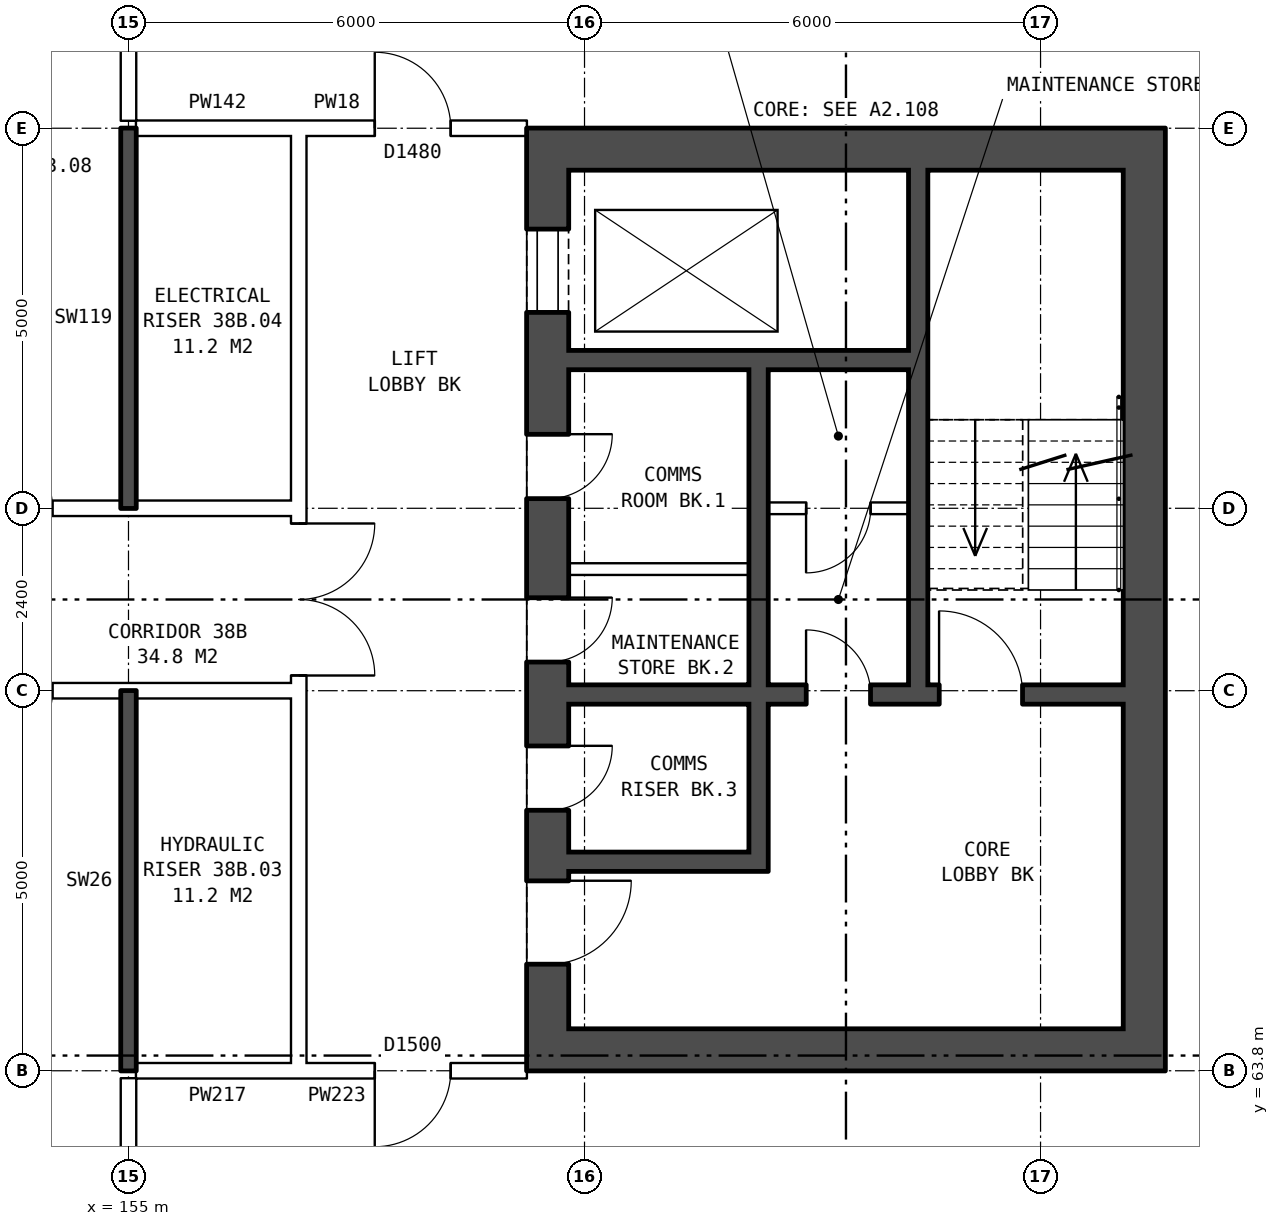
"""IFC4 building model, lengths in metres.
Left out: names, types, materials, properties, quantities, classifications, styles, units other than length and angle.
Written with IfcOpenShell. Run it as: python <this file> out.ifc"""

import sys

from ifc_helpers import new_model, si_unit, direction, frame, frame_2d, origin, place, context, subcontext, project, spatial, rectangle, extrude, element, fill, save


model = new_model("IFC4")
c1 = context("Model", 3, precision=1e-05, world=origin(), true_north=direction((0.0, 1.0)))
c2 = subcontext(c1, "Body", "Model", "MODEL_VIEW")
j1 = project(units=[si_unit("LENGTHUNIT", "METRE"), si_unit("PLANEANGLEUNIT", "RADIAN")], contexts=[c1])
p1 = place(None, origin())
s1 = spatial("IfcSite", under=j1, at=p1, CompositionType="ELEMENT")
p2 = place(p1, origin())
s2 = spatial("IfcBuilding", under=s1, at=p2, CompositionType="ELEMENT")
p3 = place(p2, frame((0.0, 0.0, 136.1)))
s3 = spatial("IfcBuildingStorey", under=s2, at=p3, CompositionType="ELEMENT", Elevation=136.1)
p4 = place(p3, frame((160.515, 76.2, 0.0), z_axis=(0.0, 0.0, 1.0), x_axis=(0.0, -1.0, 0.0)))
e1 = element("IfcWall", 1, at=p4, inside=s3, PredefinedType="SHEAR", context=c2, shape_type="SweptSolid", body=[
    extrude(rectangle(XDim=12.4, YDim=0.55, at=frame_2d((6.2, 0.0))), origin(), (0.0, 0.0, 1.0), 2.85),
])
p5 = place(p4, frame((1.325, 0.0, 0.0)))
e2 = element("IfcOpeningElement", 2, at=p5, cuts=e1, PredefinedType="OPENING", context=c2, shape_type="SweptSolid", body=[
    extrude(rectangle(XDim=1.1, YDim=2.1, at=frame_2d((0.55, 1.05))), frame((0.0, 0.285, 0.0), z_axis=(0.0, -1.0, 0.0), x_axis=(1.0, 0.0, 0.0)), (0.0, 0.0, 1.0), 0.57),
])
p6 = place(p4, frame((4.025, 0.0, 0.0)))
e3 = element("IfcOpeningElement", 3, at=p6, cuts=e1, PredefinedType="OPENING", context=c2, shape_type="SweptSolid", body=[
    extrude(rectangle(XDim=0.85, YDim=2.1, at=frame_2d((0.425, 1.05))), frame((0.0, 0.285, 0.0), z_axis=(0.0, -1.0, 0.0), x_axis=(1.0, 0.0, 0.0)), (0.0, 0.0, 1.0), 0.57),
])
p7 = place(p4, frame((6.175, 0.0, 0.0)))
e4 = element("IfcOpeningElement", 4, at=p7, cuts=e1, PredefinedType="OPENING", context=c2, shape_type="SweptSolid", body=[
    extrude(rectangle(XDim=0.85, YDim=2.1, at=frame_2d((0.425, 1.05))), frame((0.0, 0.285, 0.0), z_axis=(0.0, -1.0, 0.0), x_axis=(1.0, 0.0, 0.0)), (0.0, 0.0, 1.0), 0.57),
])
p8 = place(p4, frame((9.9, 0.0, 0.0)))
e5 = element("IfcOpeningElement", 5, at=p8, cuts=e1, PredefinedType="OPENING", context=c2, shape_type="SweptSolid", body=[
    extrude(rectangle(XDim=1.1, YDim=2.1, at=frame_2d((0.55, 1.05))), frame((0.0, 0.285, 0.0), z_axis=(0.0, -1.0, 0.0), x_axis=(1.0, 0.0, 0.0)), (0.0, 0.0, 1.0), 0.57),
])
p9 = place(p4, frame((8.125, 0.0, 0.0)))
e6 = element("IfcOpeningElement", 6, at=p9, cuts=e1, PredefinedType="OPENING", context=c2, shape_type="SweptSolid", body=[
    extrude(rectangle(XDim=0.85, YDim=2.1, at=frame_2d((0.425, 1.05))), frame((0.0, 0.285, 0.0), z_axis=(0.0, -1.0, 0.0), x_axis=(1.0, 0.0, 0.0)), (0.0, 0.0, 1.0), 0.57),
])
p10 = place(p3, frame((168.365, 76.2, 0.0), z_axis=(0.0, 0.0, 1.0), x_axis=(0.0, -1.0, 0.0)))
e7 = element("IfcWall", 7, at=p10, inside=s3, PredefinedType="SHEAR", context=c2, shape_type="SweptSolid", body=[
    extrude(rectangle(XDim=12.4, YDim=0.55, at=frame_2d((6.2, 0.0))), origin(), (0.0, 0.0, 1.0), 2.85),
])
for number, where, z_axis, x_axis in (
    (8, (160.79, 75.925, 0.0), (0.0, 0.0, 1.0), (1.0, 0.0, 0.0)),
    (9, (160.79, 64.075, 0.0), (0.0, 0.0, 1.0), (1.0, 0.0, 0.0)),
):
    element("IfcWall", number, at=place(p3, frame(where, z_axis=z_axis, x_axis=x_axis)), inside=s3, PredefinedType="SHEAR", context=c2, shape_type="SweptSolid", body=[
        extrude(rectangle(XDim=7.3, YDim=0.55, at=frame_2d((3.65, 0.0))), origin(), (0.0, 0.0, 1.0), 2.85),
    ])
p11 = place(p3, frame((160.79, 73.15, 0.0), z_axis=(0.0, 0.0, 1.0), x_axis=(1.0, 0.0, 0.0)))
e10 = element("IfcWall", 10, at=p11, inside=s3, PredefinedType="SHEAR", context=c2, shape_type="SweptSolid", body=[
    extrude(rectangle(XDim=4.475, YDim=0.25, at=frame_2d((2.237, 0.0))), origin(), (0.0, 0.0, 1.0), 2.85),
])
p12 = place(p3, frame((163.415, 71.2, 0.0), z_axis=(0.0, 0.0, 1.0), x_axis=(1.0, 0.0, 0.0)))
e11 = element("IfcWall", 11, at=p12, inside=s3, PredefinedType="PARTITIONING", context=c2, shape_type="SweptSolid", body=[
    extrude(rectangle(XDim=1.85, YDim=0.15, at=frame_2d((0.925, 0.0))), origin(), (0.0, 0.0, 1.0), 2.85),
])
p13 = place(p12, frame((0.5, 0.0, 0.0)))
e12 = element("IfcOpeningElement", 12, at=p13, cuts=e11, PredefinedType="OPENING", context=c2, shape_type="SweptSolid", body=[
    extrude(rectangle(XDim=0.85, YDim=2.1, at=frame_2d((0.425, 1.05))), frame((0.0, 0.085, 0.0), z_axis=(0.0, -1.0, 0.0), x_axis=(1.0, 0.0, 0.0)), (0.0, 0.0, 1.0), 0.17),
])
p14 = place(p3, frame((160.79, 70.4, 0.0), z_axis=(0.0, 0.0, 1.0), x_axis=(1.0, 0.0, 0.0)))
e13 = element("IfcWall", 13, at=p14, inside=s3, PredefinedType="PARTITIONING", context=c2, shape_type="SweptSolid", body=[
    extrude(rectangle(XDim=2.375, YDim=0.15, at=frame_2d((1.188, 0.0))), origin(), (0.0, 0.0, 1.0), 2.85),
])
p15 = place(p3, frame((160.79, 68.75, 0.0), z_axis=(0.0, 0.0, 1.0), x_axis=(1.0, 0.0, 0.0)))
e14 = element("IfcWall", 14, at=p15, inside=s3, PredefinedType="SHEAR", context=c2, shape_type="SweptSolid", body=[
    extrude(rectangle(XDim=7.3, YDim=0.25, at=frame_2d((3.65, 0.0))), origin(), (0.0, 0.0, 1.0), 2.85),
])
p16 = place(p15, frame((4.875, 0.0, 0.0)))
e15 = element("IfcOpeningElement", 15, at=p16, cuts=e14, PredefinedType="OPENING", context=c2, shape_type="SweptSolid", body=[
    extrude(rectangle(XDim=1.1, YDim=2.1, at=frame_2d((0.55, 1.05))), frame((0.0, 0.135, 0.0), z_axis=(0.0, -1.0, 0.0), x_axis=(1.0, 0.0, 0.0)), (0.0, 0.0, 1.0), 0.27),
])
p17 = place(p15, frame((3.125, 0.0, 0.0)))
e16 = element("IfcOpeningElement", 16, at=p17, cuts=e14, PredefinedType="OPENING", context=c2, shape_type="SweptSolid", body=[
    extrude(rectangle(XDim=0.85, YDim=2.1, at=frame_2d((0.425, 1.05))), frame((0.0, 0.135, 0.0), z_axis=(0.0, -1.0, 0.0), x_axis=(1.0, 0.0, 0.0)), (0.0, 0.0, 1.0), 0.27),
])
p18 = place(p3, frame((160.79, 66.55, 0.0), z_axis=(0.0, 0.0, 1.0), x_axis=(1.0, 0.0, 0.0)))
e17 = element("IfcWall", 17, at=p18, inside=s3, PredefinedType="SHEAR", context=c2, shape_type="SweptSolid", body=[
    extrude(rectangle(XDim=2.375, YDim=0.25, at=frame_2d((1.188, 0.0))), origin(), (0.0, 0.0, 1.0), 2.85),
])
p19 = place(p3, frame((163.29, 73.025, 0.0), z_axis=(0.0, 0.0, 1.0), x_axis=(0.0, -1.0, 0.0)))
e18 = element("IfcWall", 18, at=p19, inside=s3, PredefinedType="SHEAR", context=c2, shape_type="SweptSolid", body=[
    extrude(rectangle(XDim=4.15, YDim=0.25, at=frame_2d((2.075, 0.0))), origin(), (0.0, 0.0, 1.0), 2.85),
])
p20 = place(p3, frame((163.29, 68.625, 0.0), z_axis=(0.0, 0.0, 1.0), x_axis=(0.0, -1.0, 0.0)))
e19 = element("IfcWall", 19, at=p20, inside=s3, PredefinedType="SHEAR", context=c2, shape_type="SweptSolid", body=[
    extrude(rectangle(XDim=2.2, YDim=0.25, at=frame_2d((1.1, 0.0))), origin(), (0.0, 0.0, 1.0), 2.85),
])
p21 = place(p3, frame((165.39, 75.65, 0.0), z_axis=(0.0, 0.0, 1.0), x_axis=(0.0, -1.0, 0.0)))
e20 = element("IfcWall", 20, at=p21, inside=s3, PredefinedType="SHEAR", context=c2, shape_type="SweptSolid", body=[
    extrude(rectangle(XDim=6.775, YDim=0.25, at=frame_2d((3.387, 0.0))), origin(), (0.0, 0.0, 1.0), 2.85),
])
p22 = place(p3, frame((157.24, 63.9, 0.0), z_axis=(0.0, 0.0, 1.0), x_axis=(0.0, 1.0, 0.0)))
e21 = element("IfcWall", 21, at=p22, inside=s3, PredefinedType="PARTITIONING", context=c2, shape_type="SweptSolid", body=[
    extrude(rectangle(XDim=12.2, YDim=0.2, at=frame_2d((6.1, 0.0))), origin(), (0.0, 0.0, 1.0), 2.85),
])
p23 = place(p22, frame((5.1, 0.0, 0.0)))
e22 = element("IfcOpeningElement", 22, at=p23, cuts=e21, PredefinedType="OPENING", context=c2, shape_type="SweptSolid", body=[
    extrude(rectangle(XDim=2.0, YDim=2.1, at=frame_2d((1.0, 1.05))), frame((0.0, 0.11, 0.0), z_axis=(0.0, -1.0, 0.0), x_axis=(1.0, 0.0, 0.0)), (0.0, 0.0, 1.0), 0.22),
])
p24 = place(p3, frame((155.1, 63.8, 0.0), z_axis=(0.0, 0.0, 1.0), x_axis=(1.0, 0.0, 0.0)))
e23 = element("IfcWall", 23, at=p24, inside=s3, PredefinedType="PARTITIONING", context=c2, shape_type="SweptSolid", body=[
    extrude(rectangle(XDim=2.14, YDim=0.2, at=frame_2d((1.07, 0.0))), origin(), (0.0, 0.0, 1.0), 2.85),
])
p25 = place(p3, frame((157.24, 63.8, 0.0), z_axis=(0.0, 0.0, 1.0), x_axis=(1.0, 0.0, 0.0)))
e24 = element("IfcWall", 24, at=p25, inside=s3, PredefinedType="PARTITIONING", context=c2, shape_type="SweptSolid", body=[
    extrude(rectangle(XDim=3.0, YDim=0.2, at=frame_2d((1.5, 0.0))), origin(), (0.0, 0.0, 1.0), 2.85),
])
p26 = place(p25, frame((1.0, 0.0, 0.0)))
e25 = element("IfcOpeningElement", 25, at=p26, cuts=e24, PredefinedType="OPENING", context=c2, shape_type="SweptSolid", body=[
    extrude(rectangle(XDim=1.0, YDim=2.1, at=frame_2d((0.5, 1.05))), frame((0.0, 0.11, 0.0), z_axis=(0.0, -1.0, 0.0), x_axis=(1.0, 0.0, 0.0)), (0.0, 0.0, 1.0), 0.22),
])
p27 = place(p3, frame((142.76, 68.8, 0.0), z_axis=(0.0, 0.0, 1.0), x_axis=(1.0, 0.0, 0.0)))
e26 = element("IfcWall", 26, at=p27, inside=s3, PredefinedType="PARTITIONING", context=c2, shape_type="SweptSolid", body=[
    extrude(rectangle(XDim=14.48, YDim=0.2, at=frame_2d((7.24, 0.0))), origin(), (0.0, 0.0, 1.0), 2.85),
])
p28 = place(p27, frame((4.24, 0.0, 0.0)))
e27 = element("IfcOpeningElement", 27, at=p28, cuts=e26, PredefinedType="OPENING", context=c2, shape_type="SweptSolid", body=[
    extrude(rectangle(XDim=1.0, YDim=2.1, at=frame_2d((0.5, 1.05))), frame((0.0, 0.11, 0.0), z_axis=(0.0, -1.0, 0.0), x_axis=(1.0, 0.0, 0.0)), (0.0, 0.0, 1.0), 0.22),
])
p29 = place(p27, frame((10.24, 0.0, 0.0)))
e28 = element("IfcOpeningElement", 28, at=p29, cuts=e26, PredefinedType="OPENING", context=c2, shape_type="SweptSolid", body=[
    extrude(rectangle(XDim=1.0, YDim=2.1, at=frame_2d((0.5, 1.05))), frame((0.0, 0.11, 0.0), z_axis=(0.0, -1.0, 0.0), x_axis=(1.0, 0.0, 0.0)), (0.0, 0.0, 1.0), 0.22),
])
p30 = place(p3, frame((142.76, 71.2, 0.0), z_axis=(0.0, 0.0, 1.0), x_axis=(1.0, 0.0, 0.0)))
e29 = element("IfcWall", 29, at=p30, inside=s3, PredefinedType="PARTITIONING", context=c2, shape_type="SweptSolid", body=[
    extrude(rectangle(XDim=14.48, YDim=0.2, at=frame_2d((7.24, 0.0))), origin(), (0.0, 0.0, 1.0), 2.85),
])
p31 = place(p30, frame((1.12, 0.0, 0.0)))
e30 = element("IfcOpeningElement", 30, at=p31, cuts=e29, PredefinedType="OPENING", context=c2, shape_type="SweptSolid", body=[
    extrude(rectangle(XDim=1.0, YDim=2.1, at=frame_2d((0.5, 1.05))), frame((0.0, 0.11, 0.0), z_axis=(0.0, -1.0, 0.0), x_axis=(1.0, 0.0, 0.0)), (0.0, 0.0, 1.0), 0.22),
])
p32 = place(p30, frame((10.24, 0.0, 0.0)))
e31 = element("IfcOpeningElement", 31, at=p32, cuts=e29, PredefinedType="OPENING", context=c2, shape_type="SweptSolid", body=[
    extrude(rectangle(XDim=1.0, YDim=2.1, at=frame_2d((0.5, 1.05))), frame((0.0, 0.11, 0.0), z_axis=(0.0, -1.0, 0.0), x_axis=(1.0, 0.0, 0.0)), (0.0, 0.0, 1.0), 0.22),
])
p33 = place(p3, frame((155.1, 76.2, 0.0), z_axis=(0.0, 0.0, 1.0), x_axis=(1.0, 0.0, 0.0)))
e32 = element("IfcWall", 32, at=p33, inside=s3, PredefinedType="PARTITIONING", context=c2, shape_type="SweptSolid", body=[
    extrude(rectangle(XDim=2.14, YDim=0.2, at=frame_2d((1.07, 0.0))), origin(), (0.0, 0.0, 1.0), 2.85),
])
p34 = place(p3, frame((157.24, 76.2, 0.0), z_axis=(0.0, 0.0, 1.0), x_axis=(1.0, 0.0, 0.0)))
e33 = element("IfcWall", 33, at=p34, inside=s3, PredefinedType="PARTITIONING", context=c2, shape_type="SweptSolid", body=[
    extrude(rectangle(XDim=3.0, YDim=0.2, at=frame_2d((1.5, 0.0))), origin(), (0.0, 0.0, 1.0), 2.85),
])
p35 = place(p34, frame((1.0, 0.0, 0.0)))
e34 = element("IfcOpeningElement", 34, at=p35, cuts=e33, PredefinedType="OPENING", context=c2, shape_type="SweptSolid", body=[
    extrude(rectangle(XDim=1.0, YDim=2.1, at=frame_2d((0.5, 1.05))), frame((0.0, 0.11, 0.0), z_axis=(0.0, -1.0, 0.0), x_axis=(1.0, 0.0, 0.0)), (0.0, 0.0, 1.0), 0.22),
])
p36 = place(p3, frame((155.0, 61.5, 0.0), z_axis=(0.0, 0.0, 1.0), x_axis=(0.0, 1.0, 0.0)))
e35 = element("IfcWall", 35, at=p36, inside=s3, PredefinedType="PARTITIONING", context=c2, shape_type="SweptSolid", body=[
    extrude(rectangle(XDim=2.2, YDim=0.2, at=frame_2d((1.1, 0.0))), origin(), (0.0, 0.0, 1.0), 2.85),
])
for number, where, z_axis, x_axis in (
    (36, (155.0, 63.8, 0.0), (0.0, 0.0, 1.0), (0.0, 1.0, 0.0)),
    (37, (155.0, 71.2, 0.0), (0.0, 0.0, 1.0), (0.0, 1.0, 0.0)),
):
    element("IfcWall", number, at=place(p3, frame(where, z_axis=z_axis, x_axis=x_axis)), inside=s3, PredefinedType="SOLIDWALL", context=c2, shape_type="SweptSolid", body=[
        extrude(rectangle(XDim=5.0, YDim=0.2, at=frame_2d((2.5, 0.0))), origin(), (0.0, 0.0, 1.0), 2.85),
    ])
p37 = place(p3, frame((155.0, 76.3, 0.0), z_axis=(0.0, 0.0, 1.0), x_axis=(0.0, 1.0, 0.0)))
e38 = element("IfcWall", 38, at=p37, inside=s3, PredefinedType="PARTITIONING", context=c2, shape_type="SweptSolid", body=[
    extrude(rectangle(XDim=2.2, YDim=0.2, at=frame_2d((1.1, 0.0))), origin(), (0.0, 0.0, 1.0), 2.85),
])
p38 = place(p5, origin())
e39 = element("IfcDoor", 39, at=p38, inside=s3, OperationType="DOUBLE_DOOR_SLIDING", PredefinedType="DOOR", context=c2, shape_type="SweptSolid", body=[
    extrude(rectangle(XDim=1.1, YDim=2.1, at=frame_2d((0.55, 1.05))), frame((0.0, 0.26, 0.0), z_axis=(0.0, -1.0, 0.0), x_axis=(1.0, 0.0, 0.0)), (0.0, 0.0, 1.0), 0.05),
])
fill(e2, e39)
p39 = place(p6, origin())
e40 = element("IfcDoor", 40, at=p39, inside=s3, OperationType="SINGLE_SWING_LEFT", PredefinedType="DOOR", context=c2, shape_type="SweptSolid", body=[
    extrude(rectangle(XDim=0.85, YDim=2.1, at=frame_2d((0.425, 1.05))), frame((0.0, 0.26, 0.0), z_axis=(0.0, -1.0, 0.0), x_axis=(1.0, 0.0, 0.0)), (0.0, 0.0, 1.0), 0.05),
])
fill(e3, e40)
p40 = place(p7, origin())
e41 = element("IfcDoor", 41, at=p40, inside=s3, OperationType="SINGLE_SWING_LEFT", PredefinedType="DOOR", context=c2, shape_type="SweptSolid", body=[
    extrude(rectangle(XDim=0.85, YDim=2.1, at=frame_2d((0.425, 1.05))), frame((0.0, 0.26, 0.0), z_axis=(0.0, -1.0, 0.0), x_axis=(1.0, 0.0, 0.0)), (0.0, 0.0, 1.0), 0.05),
])
fill(e4, e41)
p41 = place(p8, origin())
e42 = element("IfcDoor", 42, at=p41, inside=s3, OperationType="SINGLE_SWING_LEFT", PredefinedType="DOOR", context=c2, shape_type="SweptSolid", body=[
    extrude(rectangle(XDim=1.1, YDim=2.1, at=frame_2d((0.55, 1.05))), frame((0.0, 0.26, 0.0), z_axis=(0.0, -1.0, 0.0), x_axis=(1.0, 0.0, 0.0)), (0.0, 0.0, 1.0), 0.05),
])
fill(e5, e42)
p42 = place(p16, origin())
e43 = element("IfcDoor", 43, at=p42, inside=s3, OperationType="SINGLE_SWING_LEFT", PredefinedType="DOOR", context=c2, shape_type="SweptSolid", body=[
    extrude(rectangle(XDim=1.1, YDim=2.1, at=frame_2d((0.55, 1.05))), frame((0.0, 0.025, 0.0), z_axis=(0.0, -1.0, 0.0), x_axis=(1.0, 0.0, 0.0)), (0.0, 0.0, 1.0), 0.05),
])
fill(e15, e43)
p43 = place(p9, origin())
e44 = element("IfcDoor", 44, at=p43, inside=s3, OperationType="SINGLE_SWING_LEFT", PredefinedType="DOOR", context=c2, shape_type="SweptSolid", body=[
    extrude(rectangle(XDim=0.85, YDim=2.1, at=frame_2d((0.425, 1.05))), frame((0.0, 0.26, 0.0), z_axis=(0.0, -1.0, 0.0), x_axis=(1.0, 0.0, 0.0)), (0.0, 0.0, 1.0), 0.05),
])
fill(e6, e44)
p44 = place(p17, origin())
e45 = element("IfcDoor", 45, at=p44, inside=s3, OperationType="SINGLE_SWING_LEFT", PredefinedType="DOOR", context=c2, shape_type="SweptSolid", body=[
    extrude(rectangle(XDim=0.85, YDim=2.1, at=frame_2d((0.425, 1.05))), frame((0.0, 0.025, 0.0), z_axis=(0.0, -1.0, 0.0), x_axis=(1.0, 0.0, 0.0)), (0.0, 0.0, 1.0), 0.05),
])
fill(e16, e45)
p45 = place(p13, frame((0.85, 0.0, 0.0), z_axis=(0.0, 0.0, 1.0), x_axis=(-1.0, 0.0, 0.0)))
e46 = element("IfcDoor", 46, at=p45, inside=s3, OperationType="SINGLE_SWING_RIGHT", PredefinedType="DOOR", context=c2, shape_type="SweptSolid", body=[
    extrude(rectangle(XDim=0.85, YDim=2.1, at=frame_2d((0.425, 1.05))), frame((0.0, 0.025, 0.0), z_axis=(0.0, -1.0, 0.0), x_axis=(1.0, 0.0, 0.0)), (0.0, 0.0, 1.0), 0.05),
])
fill(e12, e46)
p46 = place(p23, frame((2.0, 0.0, 0.0), z_axis=(0.0, 0.0, 1.0), x_axis=(-1.0, 0.0, 0.0)))
e47 = element("IfcDoor", 47, at=p46, inside=s3, OperationType="DOUBLE_DOOR_SINGLE_SWING", PredefinedType="DOOR", context=c2, shape_type="SweptSolid", body=[
    extrude(rectangle(XDim=2.0, YDim=2.1, at=frame_2d((1.0, 1.05))), frame((0.0, 0.025, 0.0), z_axis=(0.0, -1.0, 0.0), x_axis=(1.0, 0.0, 0.0)), (0.0, 0.0, 1.0), 0.05),
])
fill(e22, e47)
p47 = place(p26, frame((1.0, 0.0, 0.0), z_axis=(0.0, 0.0, 1.0), x_axis=(-1.0, 0.0, 0.0)))
e48 = element("IfcDoor", 48, at=p47, inside=s3, OperationType="SINGLE_SWING_RIGHT", PredefinedType="DOOR", context=c2, shape_type="SweptSolid", body=[
    extrude(rectangle(XDim=1.0, YDim=2.1, at=frame_2d((0.5, 1.05))), frame((0.0, 0.025, 0.0), z_axis=(0.0, -1.0, 0.0), x_axis=(1.0, 0.0, 0.0)), (0.0, 0.0, 1.0), 0.05),
])
fill(e25, e48)
p48 = place(p35, origin())
e49 = element("IfcDoor", 49, at=p48, inside=s3, OperationType="SINGLE_SWING_LEFT", PredefinedType="DOOR", context=c2, shape_type="SweptSolid", body=[
    extrude(rectangle(XDim=1.0, YDim=2.1, at=frame_2d((0.5, 1.05))), frame((0.0, 0.025, 0.0), z_axis=(0.0, -1.0, 0.0), x_axis=(1.0, 0.0, 0.0)), (0.0, 0.0, 1.0), 0.05),
])
fill(e34, e49)
save(model, sys.argv[1])
